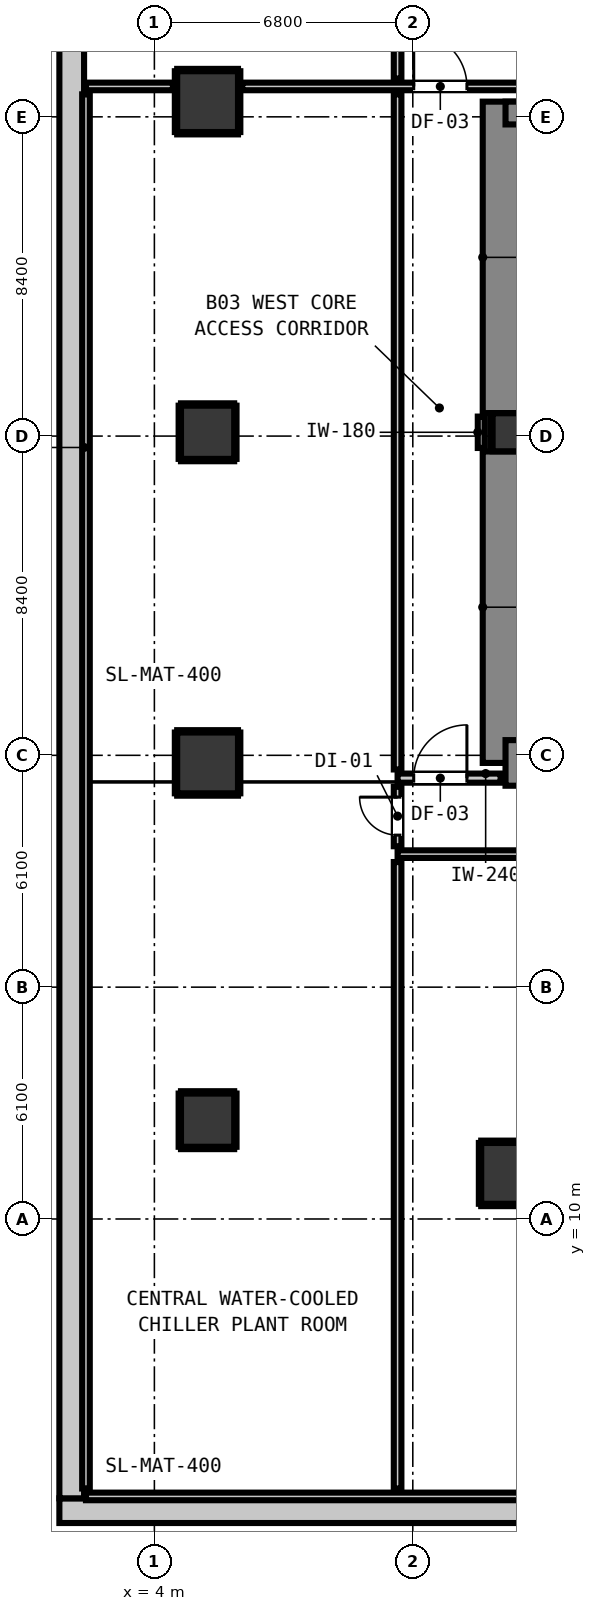
"""IFC4 building model, lengths in metres.
Left out: names, types, materials, properties, quantities, classifications, styles, units other than length and angle.
Written with IfcOpenShell. Run it as: python <this file> out.ifc"""

import sys

from ifc_helpers import new_model, si_unit, direction, frame, frame_2d, origin, origin_2d, place, context, subcontext, project, spatial, rectangle, extrude, element, fill, save


model = new_model("IFC4")
c1 = context("Model", 3, precision=1e-05, world=origin(), true_north=direction((0.0, 1.0)))
c2 = subcontext(c1, "Body", "Model", "MODEL_VIEW")
j1 = project(units=[si_unit("LENGTHUNIT", "METRE"), si_unit("PLANEANGLEUNIT", "RADIAN")], contexts=[c1])
p1 = place(None, origin())
s1 = spatial("IfcSite", under=j1, at=p1, CompositionType="ELEMENT")
p2 = place(p1, origin())
s2 = spatial("IfcBuilding", under=s1, at=p2, CompositionType="ELEMENT")
p3 = place(p2, frame((0.0, 0.0, -13.2)))
s3 = spatial("IfcBuildingStorey", under=s2, at=p3, CompositionType="ELEMENT", Elevation=-13.2)
p4 = place(p3, frame((1.5, 2.325, 0.0), z_axis=(0.0, 0.0, 1.0), x_axis=(1.0, 0.0, 0.0)))
e1 = element("IfcWall", 1, at=p4, inside=s3, PredefinedType="SOLIDWALL", context=c2, shape_type="SweptSolid", body=[
    extrude(rectangle(XDim=83.5, YDim=0.65, at=frame_2d((41.75, 0.0))), origin(), (0.0, 0.0, 1.0), 4.4),
])
p5 = place(p3, frame((1.825, 57.95, 0.0), z_axis=(0.0, 0.0, 1.0), x_axis=(0.0, -1.0, 0.0)))
e2 = element("IfcWall", 2, at=p5, inside=s3, PredefinedType="SOLIDWALL", context=c2, shape_type="SweptSolid", body=[
    extrude(rectangle(XDim=55.3, YDim=0.65, at=frame_2d((27.65, 0.0))), origin(), (0.0, 0.0, 1.0), 4.4),
])
p6 = place(p3, frame((13.4, 30.7, -0.4), z_axis=(0.0, 0.0, 1.0), x_axis=(1.0, 0.0, 0.0)))
e3 = element("IfcColumn", 3, at=p6, inside=s3, PredefinedType="COLUMN", context=c2, shape_type="SweptSolid", body=[
    extrude(rectangle(XDim=1.0, YDim=1.0, at=origin_2d()), origin(), (0.0, 0.0, 1.0), 4.8),
])
p7 = place(p3, frame((13.24, 22.0, 0.0), z_axis=(0.0, 0.0, 1.0), x_axis=(0.0, 1.0, 0.0)))
e4 = element("IfcWall", 4, at=p7, inside=s3, PredefinedType="SHEAR", context=c2, shape_type="SweptSolid", body=[
    extrude(rectangle(XDim=8.195, YDim=1.2, at=frame_2d((4.098, 0.0))), origin(), (0.0, 0.0, 1.0), 4.4),
])
p8 = place(p3, frame((13.24, 31.205, 0.0), z_axis=(0.0, 0.0, 1.0), x_axis=(0.0, 1.0, 0.0)))
e5 = element("IfcWall", 5, at=p8, inside=s3, PredefinedType="SHEAR", context=c2, shape_type="SweptSolid", body=[
    extrude(rectangle(XDim=8.195, YDim=1.2, at=frame_2d((4.097, 0.0))), origin(), (0.0, 0.0, 1.0), 4.4),
])
p9 = place(p3, frame((13.24, 22.0, 0.0), z_axis=(0.0, 0.0, 1.0), x_axis=(1.0, 0.0, 0.0)))
e6 = element("IfcWall", 6, at=p9, inside=s3, PredefinedType="SHEAR", context=c2, shape_type="SweptSolid", body=[
    extrude(rectangle(XDim=4.08, YDim=1.2, at=frame_2d((2.04, 0.0))), origin(), (0.0, 0.0, 1.0), 4.4),
])
p10 = place(p3, frame((13.24, 39.1, 0.0), z_axis=(0.0, 0.0, 1.0), x_axis=(1.0, 0.0, 0.0)))
e7 = element("IfcWall", 7, at=p10, inside=s3, PredefinedType="SHEAR", context=c2, shape_type="SweptSolid", body=[
    extrude(rectangle(XDim=4.08, YDim=0.6, at=frame_2d((2.04, 0.0))), origin(), (0.0, 0.0, 1.0), 4.4),
])
for number, where, z_axis, x_axis in (
    (8, (13.4, 11.2, -0.4), (0.0, 0.0, 1.0), (1.0, 0.0, 0.0)),
    (9, (5.4, 22.0, -0.4), (0.0, 0.0, 1.0), (1.0, 0.0, 0.0)),
):
    element("IfcColumn", number, at=place(p3, frame(where, z_axis=z_axis, x_axis=x_axis)), inside=s3, PredefinedType="COLUMN", context=c2, shape_type="SweptSolid", body=[
        extrude(rectangle(XDim=1.6, YDim=1.6, at=origin_2d()), origin(), (0.0, 0.0, 1.0), 4.8),
    ])
p11 = place(p3, frame((5.4, 30.7, -0.4), z_axis=(0.0, 0.0, 1.0), x_axis=(1.0, 0.0, 0.0)))
e10 = element("IfcColumn", 10, at=p11, inside=s3, PredefinedType="COLUMN", context=c2, shape_type="SweptSolid", body=[
    extrude(rectangle(XDim=1.4, YDim=1.4, at=origin_2d()), origin(), (0.0, 0.0, 1.0), 4.8),
])
p12 = place(p3, frame((5.4, 39.4, -0.4), z_axis=(0.0, 0.0, 1.0), x_axis=(1.0, 0.0, 0.0)))
e11 = element("IfcColumn", 11, at=p12, inside=s3, PredefinedType="COLUMN", context=c2, shape_type="SweptSolid", body=[
    extrude(rectangle(XDim=1.6, YDim=1.6, at=origin_2d()), origin(), (0.0, 0.0, 1.0), 4.8),
])
p13 = place(p3, frame((5.4, 12.6, -0.4), z_axis=(0.0, 0.0, 1.0), x_axis=(1.0, 0.0, 0.0)))
e12 = element("IfcColumn", 12, at=p13, inside=s3, PredefinedType="COLUMN", context=c2, shape_type="SweptSolid", body=[
    extrude(rectangle(XDim=1.4, YDim=1.4, at=origin_2d()), origin(), (0.0, 0.0, 1.0), 4.8),
])
p14 = place(p3, frame((10.4, 21.6, 0.0), z_axis=(0.0, 0.0, 1.0), x_axis=(1.0, 0.0, 0.0)))
e13 = element("IfcWall", 13, at=p14, inside=s3, PredefinedType="PARTITIONING", context=c2, shape_type="SweptSolid", body=[
    extrude(rectangle(XDim=2.71, YDim=0.24, at=frame_2d((1.355, 0.0))), origin(), (0.0, 0.0, 1.0), 3.335),
])
p15 = place(p14, frame((0.424, 0.0, 0.0)))
e14 = element("IfcOpeningElement", 14, at=p15, cuts=e13, PredefinedType="OPENING", context=c2, shape_type="SweptSolid", body=[
    extrude(rectangle(XDim=1.4, YDim=2.15, at=frame_2d((0.7, 1.075))), frame((0.0, 0.13, 0.0), z_axis=(0.0, -1.0, 0.0), x_axis=(1.0, 0.0, 0.0)), (0.0, 0.0, 1.0), 0.26),
])
p16 = place(p3, frame((2.2, 2.7, 0.0), z_axis=(0.0, 0.0, 1.0), x_axis=(1.0, 0.0, 0.0)))
e15 = element("IfcWall", 15, at=p16, inside=s3, PredefinedType="PARTITIONING", context=c2, shape_type="SweptSolid", body=[
    extrude(rectangle(XDim=35.1, YDim=0.2, at=frame_2d((17.55, 0.0))), origin(), (0.0, 0.0, 1.0), 4.1),
])
p17 = place(p3, frame((10.4, 19.6, 0.0), z_axis=(0.0, 0.0, 1.0), x_axis=(1.0, 0.0, 0.0)))
e16 = element("IfcWall", 16, at=p17, inside=s3, PredefinedType="PARTITIONING", context=c2, shape_type="SweptSolid", body=[
    extrude(rectangle(XDim=36.892, YDim=0.2, at=frame_2d((18.446, 0.0))), origin(), (0.0, 0.0, 1.0), 4.1),
])
p18 = place(p17, frame((12.724, 0.0, 0.0)))
e17 = element("IfcOpeningElement", 17, at=p18, cuts=e16, PredefinedType="OPENING", context=c2, shape_type="SweptSolid", body=[
    extrude(rectangle(XDim=1.5, YDim=2.15, at=frame_2d((0.75, 1.075))), frame((0.0, 0.11, 0.0), z_axis=(0.0, -1.0, 0.0), x_axis=(1.0, 0.0, 0.0)), (0.0, 0.0, 1.0), 0.22),
])
p19 = place(p3, frame((2.2, 39.8, 0.0), z_axis=(0.0, 0.0, 1.0), x_axis=(1.0, 0.0, 0.0)))
e18 = element("IfcWall", 18, at=p19, inside=s3, PredefinedType="PARTITIONING", context=c2, shape_type="SweptSolid", body=[
    extrude(rectangle(XDim=2.288, YDim=0.2, at=frame_2d((1.144, 0.0))), origin(), (0.0, 0.0, 1.0), 4.1),
])
p20 = place(p3, frame((6.312, 39.8, 0.0), z_axis=(0.0, 0.0, 1.0), x_axis=(1.0, 0.0, 0.0)))
e19 = element("IfcWall", 19, at=p20, inside=s3, PredefinedType="PARTITIONING", context=c2, shape_type="SweptSolid", body=[
    extrude(rectangle(XDim=13.876, YDim=0.2, at=frame_2d((6.938, 0.0))), origin(), (0.0, 0.0, 1.0), 3.335),
])
p21 = place(p20, frame((11.123, 0.0, 0.0)))
e20 = element("IfcOpeningElement", 20, at=p21, cuts=e19, PredefinedType="OPENING", context=c2, shape_type="SweptSolid", body=[
    extrude(rectangle(XDim=1.4, YDim=2.15, at=frame_2d((0.7, 1.075))), frame((0.0, 0.11, 0.0), z_axis=(0.0, -1.0, 0.0), x_axis=(1.0, 0.0, 0.0)), (0.0, 0.0, 1.0), 0.22),
])
p22 = place(p20, frame((4.512, 0.0, 0.0)))
e21 = element("IfcOpeningElement", 21, at=p22, cuts=e19, PredefinedType="OPENING", context=c2, shape_type="SweptSolid", body=[
    extrude(rectangle(XDim=1.4, YDim=2.15, at=frame_2d((0.7, 1.075))), frame((0.0, 0.11, 0.0), z_axis=(0.0, -1.0, 0.0), x_axis=(1.0, 0.0, 0.0)), (0.0, 0.0, 1.0), 0.22),
])
p23 = place(p3, frame((2.2, 2.908, 0.0), z_axis=(0.0, 0.0, 1.0), x_axis=(0.0, 1.0, 0.0)))
e22 = element("IfcWall", 22, at=p23, inside=s3, PredefinedType="PARTITIONING", context=c2, shape_type="SweptSolid", body=[
    extrude(rectangle(XDim=36.684, YDim=0.2, at=frame_2d((18.342, 0.0))), origin(), (0.0, 0.0, 1.0), 4.1),
])
p24 = place(p3, frame((10.4, 2.908, 0.0), z_axis=(0.0, 0.0, 1.0), x_axis=(0.0, 1.0, 0.0)))
e23 = element("IfcWall", 23, at=p24, inside=s3, PredefinedType="PARTITIONING", context=c2, shape_type="SweptSolid", body=[
    extrude(rectangle(XDim=16.484, YDim=0.2, at=frame_2d((8.242, 0.0))), origin(), (0.0, 0.0, 1.0), 4.1),
])
p25 = place(p3, frame((10.4, 19.808, 0.0), z_axis=(0.0, 0.0, 1.0), x_axis=(0.0, 1.0, 0.0)))
e24 = element("IfcWall", 24, at=p25, inside=s3, PredefinedType="PARTITIONING", context=c2, shape_type="SweptSolid", body=[
    extrude(rectangle(XDim=1.564, YDim=0.2, at=frame_2d((0.782, 0.0))), origin(), (0.0, 0.0, 1.0), 4.1),
])
p26 = place(p25, frame((0.292, 0.0, 0.0)))
e25 = element("IfcOpeningElement", 25, at=p26, cuts=e24, PredefinedType="OPENING", context=c2, shape_type="SweptSolid", body=[
    extrude(rectangle(XDim=1.0, YDim=2.15, at=frame_2d((0.5, 1.075))), frame((0.0, 0.11, 0.0), z_axis=(0.0, -1.0, 0.0), x_axis=(1.0, 0.0, 0.0)), (0.0, 0.0, 1.0), 0.22),
])
p27 = place(p3, frame((10.4, 21.828, 0.0), z_axis=(0.0, 0.0, 1.0), x_axis=(0.0, 1.0, 0.0)))
e26 = element("IfcWall", 26, at=p27, inside=s3, PredefinedType="PARTITIONING", context=c2, shape_type="SweptSolid", body=[
    extrude(rectangle(XDim=17.764, YDim=0.2, at=frame_2d((8.882, 0.0))), origin(), (0.0, 0.0, 1.0), 4.1),
])
p28 = place(p3, frame((10.4, 40.008, 0.0), z_axis=(0.0, 0.0, 1.0), x_axis=(0.0, 1.0, 0.0)))
e27 = element("IfcWall", 27, at=p28, inside=s3, PredefinedType="PARTITIONING", context=c2, shape_type="SweptSolid", body=[
    extrude(rectangle(XDim=1.384, YDim=0.2, at=frame_2d((0.692, 0.0))), origin(), (0.0, 0.0, 1.0), 4.1),
])
p29 = place(p3, frame((12.6, 30.287, 0.0), z_axis=(0.0, 0.0, 1.0), x_axis=(0.0, 1.0, 0.0)))
e28 = element("IfcWall", 28, at=p29, inside=s3, PredefinedType="PARTITIONING", context=c2, shape_type="SweptSolid", body=[
    extrude(rectangle(XDim=0.826, YDim=0.18, at=frame_2d((0.413, 0.0))), origin(), (0.0, 0.0, 1.0), 4.1),
])
p30 = place(p3, frame((12.868, 30.21, 0.0), z_axis=(0.0, 0.0, 1.0), x_axis=(0.0, 1.0, 0.0)))
e29 = element("IfcWall", 29, at=p30, inside=s3, PredefinedType="PARTITIONING", context=c2, shape_type="SweptSolid", body=[
    extrude(rectangle(XDim=0.98, YDim=0.06, at=frame_2d((0.49, 0.0))), origin(), (0.0, 0.0, 1.0), 1.45),
])
for number, where, z_axis, x_axis in (
    (30, (12.6, 10.368, 0.0), (0.0, 0.0, 1.0), (1.0, 0.0, 0.0)),
    (31, (12.6, 12.032, 0.0), (0.0, 0.0, 1.0), (1.0, 0.0, 0.0)),
):
    element("IfcWall", number, at=place(p3, frame(where, z_axis=z_axis, x_axis=x_axis)), inside=s3, PredefinedType="PARTITIONING", context=c2, shape_type="SweptSolid", body=[
        extrude(rectangle(XDim=1.6, YDim=0.06, at=frame_2d((0.8, 0.0))), origin(), (0.0, 0.0, 1.0), 1.45),
    ])
p31 = place(p3, frame((12.568, 10.4, 0.0), z_axis=(0.0, 0.0, 1.0), x_axis=(0.0, 1.0, 0.0)))
e32 = element("IfcWall", 32, at=p31, inside=s3, PredefinedType="PARTITIONING", context=c2, shape_type="SweptSolid", body=[
    extrude(rectangle(XDim=1.6, YDim=0.06, at=frame_2d((0.8, 0.0))), origin(), (0.0, 0.0, 1.0), 1.45),
])
for number, where, z_axis, x_axis in (
    (33, (4.6, 21.168, 0.0), (0.0, 0.0, 1.0), (1.0, 0.0, 0.0)),
    (34, (4.6, 22.832, 0.0), (0.0, 0.0, 1.0), (1.0, 0.0, 0.0)),
):
    element("IfcWall", number, at=place(p3, frame(where, z_axis=z_axis, x_axis=x_axis)), inside=s3, PredefinedType="PARTITIONING", context=c2, shape_type="SweptSolid", body=[
        extrude(rectangle(XDim=1.6, YDim=0.06, at=frame_2d((0.8, 0.0))), origin(), (0.0, 0.0, 1.0), 1.45),
    ])
for number, where, z_axis, x_axis in (
    (35, (4.568, 21.2, 0.0), (0.0, 0.0, 1.0), (0.0, 1.0, 0.0)),
    (36, (6.232, 21.2, 0.0), (0.0, 0.0, 1.0), (0.0, 1.0, 0.0)),
):
    element("IfcWall", number, at=place(p3, frame(where, z_axis=z_axis, x_axis=x_axis)), inside=s3, PredefinedType="PARTITIONING", context=c2, shape_type="SweptSolid", body=[
        extrude(rectangle(XDim=1.6, YDim=0.06, at=frame_2d((0.8, 0.0))), origin(), (0.0, 0.0, 1.0), 1.45),
    ])
for number, where, z_axis, x_axis in (
    (37, (4.7, 29.968, 0.0), (0.0, 0.0, 1.0), (1.0, 0.0, 0.0)),
    (38, (4.7, 31.432, 0.0), (0.0, 0.0, 1.0), (1.0, 0.0, 0.0)),
):
    element("IfcWall", number, at=place(p3, frame(where, z_axis=z_axis, x_axis=x_axis)), inside=s3, PredefinedType="PARTITIONING", context=c2, shape_type="SweptSolid", body=[
        extrude(rectangle(XDim=1.4, YDim=0.06, at=frame_2d((0.7, 0.0))), origin(), (0.0, 0.0, 1.0), 1.45),
    ])
for number, where, z_axis, x_axis in (
    (39, (4.668, 30.0, 0.0), (0.0, 0.0, 1.0), (0.0, 1.0, 0.0)),
    (40, (6.132, 30.0, 0.0), (0.0, 0.0, 1.0), (0.0, 1.0, 0.0)),
):
    element("IfcWall", number, at=place(p3, frame(where, z_axis=z_axis, x_axis=x_axis)), inside=s3, PredefinedType="PARTITIONING", context=c2, shape_type="SweptSolid", body=[
        extrude(rectangle(XDim=1.4, YDim=0.06, at=frame_2d((0.7, 0.0))), origin(), (0.0, 0.0, 1.0), 1.45),
    ])
for number, where, z_axis, x_axis in (
    (41, (4.6, 38.568, 0.0), (0.0, 0.0, 1.0), (1.0, 0.0, 0.0)),
    (42, (4.6, 40.232, 0.0), (0.0, 0.0, 1.0), (1.0, 0.0, 0.0)),
    (43, (4.568, 38.6, 0.0), (0.0, 0.0, 1.0), (0.0, 1.0, 0.0)),
    (44, (6.232, 38.6, 0.0), (0.0, 0.0, 1.0), (0.0, 1.0, 0.0)),
):
    element("IfcWall", number, at=place(p3, frame(where, z_axis=z_axis, x_axis=x_axis)), inside=s3, PredefinedType="PARTITIONING", context=c2, shape_type="SweptSolid", body=[
        extrude(rectangle(XDim=1.6, YDim=0.06, at=frame_2d((0.8, 0.0))), origin(), (0.0, 0.0, 1.0), 1.45),
    ])
for number, where, z_axis, x_axis in (
    (45, (4.7, 11.868, 0.0), (0.0, 0.0, 1.0), (1.0, 0.0, 0.0)),
    (46, (4.7, 13.332, 0.0), (0.0, 0.0, 1.0), (1.0, 0.0, 0.0)),
    (47, (4.668, 11.9, 0.0), (0.0, 0.0, 1.0), (0.0, 1.0, 0.0)),
    (48, (6.132, 11.9, 0.0), (0.0, 0.0, 1.0), (0.0, 1.0, 0.0)),
):
    element("IfcWall", number, at=place(p3, frame(where, z_axis=z_axis, x_axis=x_axis)), inside=s3, PredefinedType="PARTITIONING", context=c2, shape_type="SweptSolid", body=[
        extrude(rectangle(XDim=1.4, YDim=0.06, at=frame_2d((0.7, 0.0))), origin(), (0.0, 0.0, 1.0), 1.45),
    ])
p32 = place(p15, origin())
e49 = element("IfcDoor", 49, at=p32, inside=s3, OperationType="SINGLE_SWING_RIGHT", PredefinedType="DOOR", context=c2, shape_type="SweptSolid", body=[
    extrude(rectangle(XDim=1.4, YDim=2.15, at=frame_2d((0.7, 1.075))), frame((0.0, 0.025, 0.0), z_axis=(0.0, -1.0, 0.0), x_axis=(1.0, 0.0, 0.0)), (0.0, 0.0, 1.0), 0.05),
])
fill(e14, e49)
p33 = place(p22, origin())
e50 = element("IfcDoor", 50, at=p33, inside=s3, OperationType="SINGLE_SWING_LEFT", PredefinedType="DOOR", context=c2, shape_type="SweptSolid", body=[
    extrude(rectangle(XDim=1.4, YDim=2.15, at=frame_2d((0.7, 1.075))), frame((0.0, 0.025, 0.0), z_axis=(0.0, -1.0, 0.0), x_axis=(1.0, 0.0, 0.0)), (0.0, 0.0, 1.0), 0.05),
])
fill(e21, e50)
p34 = place(p26, origin())
e51 = element("IfcDoor", 51, at=p34, inside=s3, OperationType="SINGLE_SWING_RIGHT", PredefinedType="DOOR", context=c2, shape_type="SweptSolid", body=[
    extrude(rectangle(XDim=1.0, YDim=2.15, at=frame_2d((0.5, 1.075))), frame((0.0, 0.025, 0.0), z_axis=(0.0, -1.0, 0.0), x_axis=(1.0, 0.0, 0.0)), (0.0, 0.0, 1.0), 0.05),
])
fill(e25, e51)
save(model, sys.argv[1])
